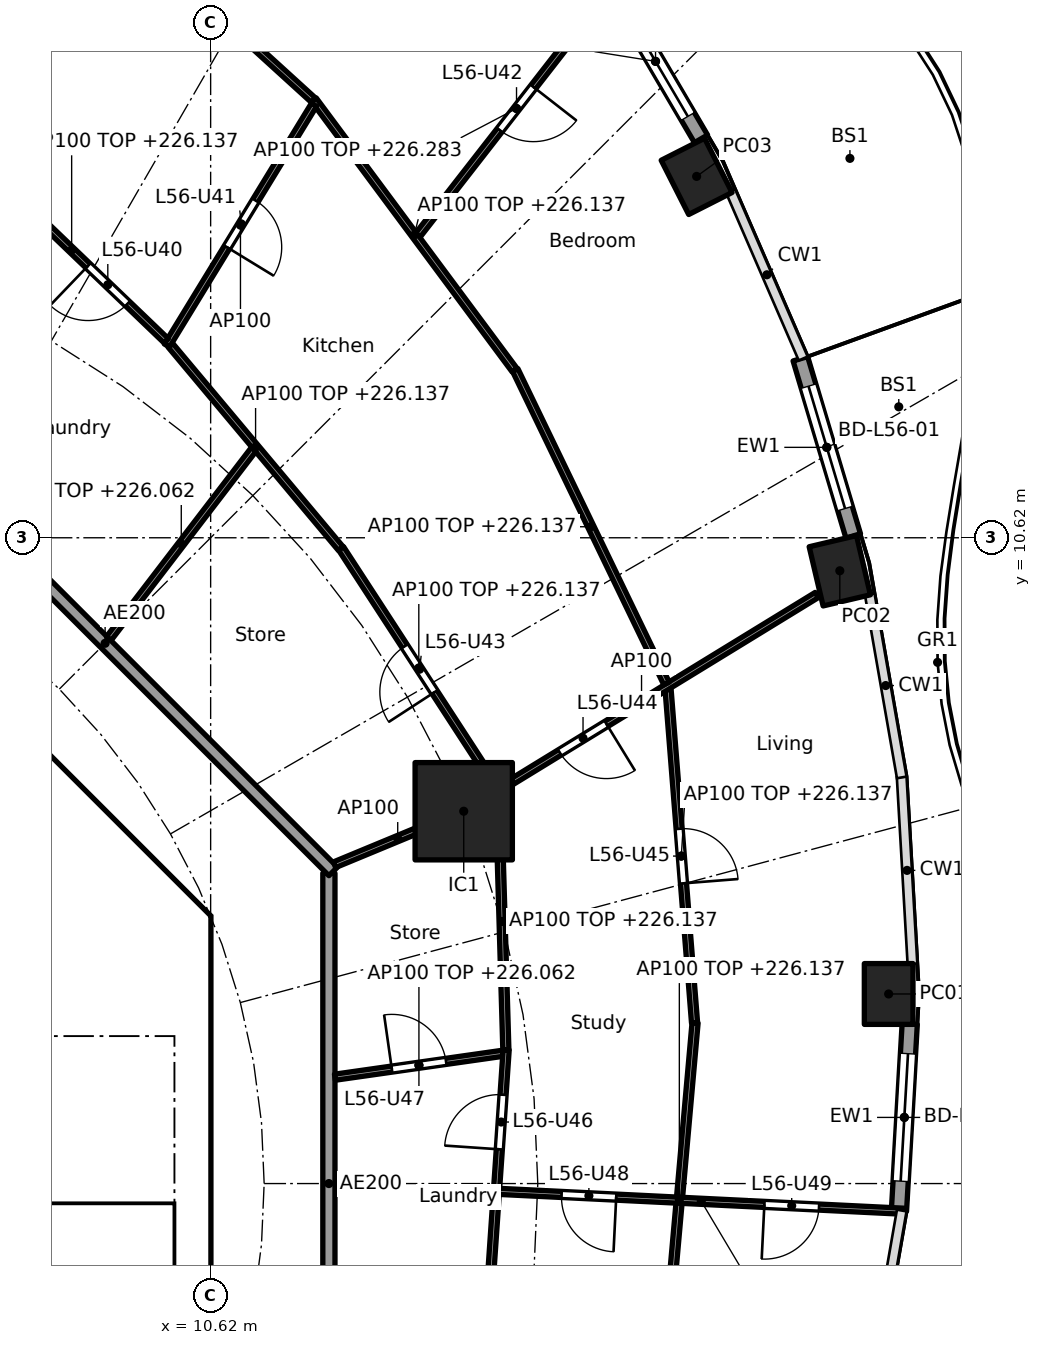
"""IFC4 building model, lengths in metres.
Left out: names, types, materials, properties, quantities, classifications, styles, units other than length and angle.
Written with IfcOpenShell. Run it as: python <this file> out.ifc"""

import sys

from ifc_helpers import new_model, si_unit, direction, frame, frame_2d, origin, origin_2d, place, context, subcontext, project, spatial, polyline, rectangle, hollow_rectangle, outline, extrude, element, fill, save


model = new_model("IFC4")
c1 = context("Model", 3, precision=1e-05, world=origin(), true_north=direction((0.0, 1.0)))
c2 = subcontext(c1, "Body", "Model", "MODEL_VIEW")
j1 = project(units=[si_unit("LENGTHUNIT", "METRE"), si_unit("PLANEANGLEUNIT", "RADIAN")], contexts=[c1])
p1 = place(None, origin())
s1 = spatial("IfcSite", under=j1, at=p1, CompositionType="ELEMENT")
p2 = place(p1, origin())
s2 = spatial("IfcBuilding", under=s1, at=p2, CompositionType="ELEMENT")
p3 = place(p2, frame((0.0, 0.0, 223.3)))
s3 = spatial("IfcBuildingStorey", under=s2, at=p3, CompositionType="ELEMENT", Elevation=223.3)
for number, where, z_axis, x_axis in (
    (1, (21.77, 3.118, 0.0), (0.0, 0.0, 1.0), (0.0, 1.0, 0.0)),
    (2, (20.967, 10.077, 0.0), (0.0, 0.0, 1.0), (-0.229, 0.973, 0.0)),
    (3, (18.612, 16.563, 0.0), (0.0, 0.0, 1.0), (-0.452, 0.892, 0.0)),
):
    element("IfcColumn", number, at=place(p3, frame(where, z_axis=z_axis, x_axis=x_axis)), inside=s3, PredefinedType="COLUMN", context=c2, shape_type="SweptSolid", body=[
        extrude(hollow_rectangle(XDim=1.0, YDim=0.8, WallThickness=0.032, at=origin_2d()), origin(), (0.0, 0.0, 1.0), 3.7),
    ])
p4 = place(p3, frame((14.782, 6.123, 0.0), z_axis=(0.0, 0.0, 1.0), x_axis=(1.0, 0.0, 0.0)))
e4 = element("IfcColumn", 4, at=p4, inside=s3, PredefinedType="COLUMN", context=c2, shape_type="SweptSolid", body=[
    extrude(rectangle(XDim=1.6, YDim=1.6, at=origin_2d()), origin(), (0.0, 0.0, 1.0), 3.7),
])
p5 = place(p3, frame((20.318, 13.564, 0.0), z_axis=(0.0, 0.0, 1.0), x_axis=(0.285785716255, -0.958293548128, 0.0)))
e5 = element("IfcWall", 5, at=p5, inside=s3, PredefinedType="SOLIDWALL", context=c2, shape_type="SweptSolid", body=[
    extrude(rectangle(XDim=3.04, YDim=0.25, at=frame_2d((1.52, 0.0))), origin(), (0.0, 0.0, 1.0), 3.44),
])
p6 = place(p5, frame((0.47, 0.0, 0.0)))
e6 = element("IfcOpeningElement", 6, at=p6, cuts=e5, PredefinedType="OPENING", context=c2, shape_type="SweptSolid", body=[
    extrude(rectangle(XDim=2.1, YDim=2.4, at=frame_2d((1.05, 1.2))), frame((0.0, 0.135, 0.0), z_axis=(0.0, -1.0, 0.0), x_axis=(1.0, 0.0, 0.0)), (0.0, 0.0, 1.0), 0.27),
])
p7 = place(p3, frame((17.188, 19.728, 0.0), z_axis=(0.0, 0.0, 1.0), x_axis=(0.506391620556, -0.862303616269, 0.0)))
e7 = element("IfcWall", 7, at=p7, inside=s3, PredefinedType="SOLIDWALL", context=c2, shape_type="SweptSolid", body=[
    extrude(rectangle(XDim=2.954, YDim=0.25, at=frame_2d((1.477, 0.0))), origin(), (0.0, 0.0, 1.0), 3.44),
])
p8 = place(p7, frame((0.427, 0.0, 0.0)))
e8 = element("IfcOpeningElement", 8, at=p8, cuts=e7, PredefinedType="OPENING", context=c2, shape_type="SweptSolid", body=[
    extrude(rectangle(XDim=2.1, YDim=2.4, at=frame_2d((1.05, 1.2))), frame((0.0, 0.135, 0.0), z_axis=(0.0, -1.0, 0.0), x_axis=(1.0, 0.0, 0.0)), (0.0, 0.0, 1.0), 0.27),
])
p9 = place(p3, frame((22.116, 2.626, 0.0), z_axis=(0.0, 0.0, 1.0), x_axis=(-0.057528189427, -0.998343882348, 0.0)))
e9 = element("IfcWall", 9, at=p9, inside=s3, PredefinedType="SOLIDWALL", context=c2, shape_type="SweptSolid", body=[
    extrude(rectangle(XDim=3.081, YDim=0.25, at=frame_2d((1.541, 0.0))), origin(), (0.0, 0.0, 1.0), 3.44),
])
p10 = place(p9, frame((0.49, 0.0, 0.0)))
e10 = element("IfcOpeningElement", 10, at=p10, cuts=e9, PredefinedType="OPENING", context=c2, shape_type="SweptSolid", body=[
    extrude(rectangle(XDim=2.1, YDim=2.4, at=frame_2d((1.05, 1.2))), frame((0.0, 0.135, 0.0), z_axis=(0.0, -1.0, 0.0), x_axis=(1.0, 0.0, 0.0)), (0.0, 0.0, 1.0), 0.27),
])
p11 = place(p3, frame((9.988, 4.613, 0.0), z_axis=(0.0, 0.0, 1.0), x_axis=(-0.707106781187, 0.707106781187, 0.0)))
e11 = element("IfcWall", 11, at=p11, inside=s3, PredefinedType="SHEAR", context=c2, shape_type="SweptSolid", body=[
    extrude(rectangle(XDim=7.602, YDim=0.6, at=frame_2d((3.801, 0.0))), origin(), (0.0, 0.0, 1.0), 3.44),
])
p12 = place(p11, frame((3.201, 0.0, 0.0)))
e12 = element("IfcOpeningElement", 12, at=p12, cuts=e11, PredefinedType="OPENING", context=c2, shape_type="SweptSolid", body=[
    extrude(rectangle(XDim=1.2, YDim=2.1, at=frame_2d((0.6, 1.05))), frame((0.0, 0.31, 0.0), z_axis=(0.0, -1.0, 0.0), x_axis=(1.0, 0.0, 0.0)), (0.0, 0.0, 1.0), 0.62),
])
p13 = place(p3, frame((6.7, 4.0, 0.0), z_axis=(0.0, 0.0, 1.0), x_axis=(1.0, 0.0, 0.0)))
e13 = element("IfcWall", 13, at=p13, inside=s3, PredefinedType="SOLIDWALL", context=c2, shape_type="SweptSolid", body=[
    extrude(rectangle(XDim=3.325, YDim=0.2, at=frame_2d((1.662, 0.0))), origin(), (0.0, 0.0, 1.0), 3.44),
])
p14 = place(p13, frame((1.25, 0.0, 0.0)))
e14 = element("IfcOpeningElement", 14, at=p14, cuts=e13, PredefinedType="OPENING", context=c2, shape_type="SweptSolid", body=[
    extrude(rectangle(XDim=1.1, YDim=2.1, at=frame_2d((0.55, 1.05))), frame((0.0, 0.11, 0.0), z_axis=(0.0, -1.0, 0.0), x_axis=(1.0, 0.0, 0.0)), (0.0, 0.0, 1.0), 0.22),
])
p15 = place(p3, origin())
e15 = element("IfcWall", 15, at=p15, inside=s3, PredefinedType="SHEAR", context=c2, shape_type="SweptSolid", body=[
    extrude(outline(polyline([(9.776, -4.401), (10.025, -4.152), (10.025, -3.801), (10.025, 4.152), (9.776, 4.401), (10.2, 4.825), (10.625, 4.401), (10.625, -4.401), (10.2, -4.825), (9.776, -4.401)])), origin(), (0.0, 0.0, 1.0), 3.44),
])
p16 = place(p3, frame((12.565, -5.104, 0.0), z_axis=(0.0, 0.0, 1.0), x_axis=(0.0, 1.0, 0.0)))
e16 = element("IfcWall", 16, at=p16, inside=s3, PredefinedType="PARTITIONING", context=c2, shape_type="SweptSolid", body=[
    extrude(rectangle(XDim=10.209, YDim=0.2, at=frame_2d((5.104, 0.0))), origin(), (0.0, 0.0, 1.0), 3.44),
])
p17 = place(p3, frame((12.635, 5.134, 0.0), z_axis=(0.0, 0.0, 1.0), x_axis=(-0.707106781187, 0.707106781187, 0.0)))
e17 = element("IfcWall", 17, at=p17, inside=s3, PredefinedType="PARTITIONING", context=c2, shape_type="SweptSolid", body=[
    extrude(rectangle(XDim=10.609, YDim=0.2, at=frame_2d((5.305, 0.0))), origin(), (0.0, 0.0, 1.0), 3.44),
])
p18 = place(p3, frame((12.664, 1.749, 0.0), z_axis=(0.0, 0.0, 1.0), x_axis=(0.990007147727, 0.14101718849, 0.0)))
e18 = element("IfcWall", 18, at=p18, inside=s3, PredefinedType="PARTITIONING", context=c2, shape_type="SweptSolid", body=[
    extrude(rectangle(XDim=2.791, YDim=0.1, at=frame_2d((1.396, 0.0))), origin(), (0.0, 0.0, 1.0), 2.762),
])
p19 = place(p18, frame((0.946, 0.0, 0.0)))
e19 = element("IfcOpeningElement", 19, at=p19, cuts=e18, PredefinedType="OPENING", context=c2, shape_type="SweptSolid", body=[
    extrude(rectangle(XDim=0.9, YDim=2.1, at=frame_2d((0.45, 1.05))), frame((0.0, 0.06, 0.0), z_axis=(0.0, -1.0, 0.0), x_axis=(1.0, 0.0, 0.0)), (0.0, 0.0, 1.0), 0.12),
])
p20 = place(p3, frame((15.475, 2.2, 0.0), z_axis=(0.0, 0.0, 1.0), x_axis=(-0.029254637498, 0.999571991497, 0.0)))
e20 = element("IfcWall", 20, at=p20, inside=s3, PredefinedType="PARTITIONING", context=c2, shape_type="SweptSolid", body=[
    extrude(rectangle(XDim=4.223, YDim=0.1, at=frame_2d((2.111, 0.0))), origin(), (0.0, 0.0, 1.0), 2.837),
])
p21 = place(p3, frame((15.48, 2.199, 0.0), z_axis=(0.0, 0.0, 1.0), x_axis=(-0.068558685949, -0.997647085186, 0.0)))
e21 = element("IfcWall", 21, at=p21, inside=s3, PredefinedType="PARTITIONING", context=c2, shape_type="SweptSolid", body=[
    extrude(rectangle(XDim=8.365, YDim=0.1, at=frame_2d((4.183, 0.0))), origin(), (0.0, 0.0, 1.0), 2.837),
])
p22 = place(p21, frame((0.74, 0.0, 0.0)))
e22 = element("IfcOpeningElement", 22, at=p22, cuts=e21, PredefinedType="OPENING", context=c2, shape_type="SweptSolid", body=[
    extrude(rectangle(XDim=0.9, YDim=2.1, at=frame_2d((0.45, 1.05))), frame((0.0, 0.06, 0.0), z_axis=(0.0, -1.0, 0.0), x_axis=(1.0, 0.0, 0.0)), (0.0, 0.0, 1.0), 0.12),
])
p23 = place(p3, frame((18.578, 2.642, 0.0), z_axis=(0.0, 0.0, 1.0), x_axis=(-0.079179272956, 0.9968603928, 0.0)))
e23 = element("IfcWall", 23, at=p23, inside=s3, PredefinedType="PARTITIONING", context=c2, shape_type="SweptSolid", body=[
    extrude(rectangle(XDim=5.504, YDim=0.1, at=frame_2d((2.752, 0.0))), origin(), (0.0, 0.0, 1.0), 2.837),
])
p24 = place(p23, frame((2.302, 0.0, 0.0)))
e24 = element("IfcOpeningElement", 24, at=p24, cuts=e23, PredefinedType="OPENING", context=c2, shape_type="SweptSolid", body=[
    extrude(rectangle(XDim=0.9, YDim=2.1, at=frame_2d((0.45, 1.05))), frame((0.0, 0.06, 0.0), z_axis=(0.0, -1.0, 0.0), x_axis=(1.0, 0.0, 0.0)), (0.0, 0.0, 1.0), 0.12),
])
p25 = place(p3, frame((18.586, 2.642, 0.0), z_axis=(0.0, 0.0, 1.0), x_axis=(-0.088638473361, -0.996063863937, 0.0)))
e25 = element("IfcWall", 25, at=p25, inside=s3, PredefinedType="PARTITIONING", context=c2, shape_type="SweptSolid", body=[
    extrude(rectangle(XDim=5.836, YDim=0.1, at=frame_2d((2.918, 0.0))), origin(), (0.0, 0.0, 1.0), 2.837),
])
p26 = place(p3, frame((12.657, 5.243, 0.0), z_axis=(0.0, 0.0, 1.0), x_axis=(0.923864733477, 0.382719158442, 0.0)))
e26 = element("IfcWall", 26, at=p26, inside=s3, PredefinedType="PARTITIONING", context=c2, shape_type="SweptSolid", body=[
    extrude(rectangle(XDim=2.25, YDim=0.1, at=frame_2d((1.125, 0.0))), origin(), (0.0, 0.0, 1.0), 3.44),
])
p27 = place(p3, frame((14.825, 6.149, 0.0), z_axis=(0.0, 0.0, 1.0), x_axis=(0.852781365284, 0.522268075824, 0.0)))
e27 = element("IfcWall", 27, at=p27, inside=s3, PredefinedType="PARTITIONING", context=c2, shape_type="SweptSolid", body=[
    extrude(rectangle(XDim=6.758, YDim=0.1, at=frame_2d((3.379, 0.0))), origin(), (0.0, 0.0, 1.0), 3.44),
])
p28 = place(p27, frame((1.801, 0.0, 0.0)))
e28 = element("IfcOpeningElement", 28, at=p28, cuts=e27, PredefinedType="OPENING", context=c2, shape_type="SweptSolid", body=[
    extrude(rectangle(XDim=0.9, YDim=2.1, at=frame_2d((0.45, 1.05))), frame((0.0, 0.06, 0.0), z_axis=(0.0, -1.0, 0.0), x_axis=(1.0, 0.0, 0.0)), (0.0, 0.0, 1.0), 0.12),
])
p29 = place(p3, frame((15.323, 6.512, 0.0), z_axis=(0.0, 0.0, 1.0), x_axis=(-0.545191322361, 0.8383116497, 0.0)))
e29 = element("IfcWall", 29, at=p29, inside=s3, PredefinedType="PARTITIONING", context=c2, shape_type="SweptSolid", body=[
    extrude(rectangle(XDim=4.693, YDim=0.1, at=frame_2d((2.346, 0.0))), origin(), (0.0, 0.0, 1.0), 2.837),
])
p30 = place(p29, frame((1.871, 0.0, 0.0)))
e30 = element("IfcOpeningElement", 30, at=p30, cuts=e29, PredefinedType="OPENING", context=c2, shape_type="SweptSolid", body=[
    extrude(rectangle(XDim=0.9, YDim=2.1, at=frame_2d((0.45, 1.05))), frame((0.0, 0.06, 0.0), z_axis=(0.0, -1.0, 0.0), x_axis=(1.0, 0.0, 0.0)), (0.0, 0.0, 1.0), 0.12),
])
p31 = place(p3, frame((18.117, 8.224, 0.0), z_axis=(0.0, 0.0, 1.0), x_axis=(-0.434647681571, 0.900600573453, 0.0)))
e31 = element("IfcWall", 31, at=p31, inside=s3, PredefinedType="PARTITIONING", context=c2, shape_type="SweptSolid", body=[
    extrude(rectangle(XDim=5.724, YDim=0.1, at=frame_2d((2.862, 0.0))), origin(), (0.0, 0.0, 1.0), 2.837),
])
p32 = place(p3, frame((12.759, 10.443, 0.0), z_axis=(0.0, 0.0, 1.0), x_axis=(-0.642225196965, 0.766516011825, 0.0)))
e32 = element("IfcWall", 32, at=p32, inside=s3, PredefinedType="PARTITIONING", context=c2, shape_type="SweptSolid", body=[
    extrude(rectangle(XDim=4.361, YDim=0.1, at=frame_2d((2.18, 0.0))), origin(), (0.0, 0.0, 1.0), 2.837),
])
p33 = place(p3, frame((15.621, 13.374, 0.0), z_axis=(0.0, 0.0, 1.0), x_axis=(-0.596165830899, 0.802861321816, 0.0)))
e33 = element("IfcWall", 33, at=p33, inside=s3, PredefinedType="PARTITIONING", context=c2, shape_type="SweptSolid", body=[
    extrude(rectangle(XDim=5.542, YDim=0.1, at=frame_2d((2.771, 0.0))), origin(), (0.0, 0.0, 1.0), 2.837),
])
p34 = place(p3, frame((8.946, 8.964, 0.0), z_axis=(0.0, 0.0, 1.0), x_axis=(0.608213063121, 0.793773815296, 0.0)))
e34 = element("IfcWall", 34, at=p34, inside=s3, PredefinedType="PARTITIONING", context=c2, shape_type="SweptSolid", body=[
    extrude(rectangle(XDim=3.918, YDim=0.1, at=frame_2d((1.959, 0.0))), origin(), (0.0, 0.0, 1.0), 2.762),
])
p35 = place(p3, frame((14.029, 15.598, 0.0), z_axis=(0.0, 0.0, 1.0), x_axis=(0.614558710688, 0.788871086501, 0.0)))
e35 = element("IfcWall", 35, at=p35, inside=s3, PredefinedType="PARTITIONING", context=c2, shape_type="SweptSolid", body=[
    extrude(rectangle(XDim=5.276, YDim=0.1, at=frame_2d((2.638, 0.0))), origin(), (0.0, 0.0, 1.0), 2.983),
])
p36 = place(p35, frame((2.188, 0.0, 0.0)))
e36 = element("IfcOpeningElement", 36, at=p36, cuts=e35, PredefinedType="OPENING", context=c2, shape_type="SweptSolid", body=[
    extrude(rectangle(XDim=0.9, YDim=2.1, at=frame_2d((0.45, 1.05))), frame((0.0, 0.06, 0.0), z_axis=(0.0, -1.0, 0.0), x_axis=(1.0, 0.0, 0.0)), (0.0, 0.0, 1.0), 0.12),
])
p37 = place(p3, frame((9.9, 13.781, 0.0), z_axis=(0.0, 0.0, 1.0), x_axis=(0.521464905534, 0.853272730313, 0.0)))
e37 = element("IfcWall", 37, at=p37, inside=s3, PredefinedType="PARTITIONING", context=c2, shape_type="SweptSolid", body=[
    extrude(rectangle(XDim=4.641, YDim=0.1, at=frame_2d((2.32, 0.0))), origin(), (0.0, 0.0, 1.0), 3.44),
])
p38 = place(p37, frame((1.895, 0.0, 0.0)))
e38 = element("IfcOpeningElement", 38, at=p38, cuts=e37, PredefinedType="OPENING", context=c2, shape_type="SweptSolid", body=[
    extrude(rectangle(XDim=0.9, YDim=2.1, at=frame_2d((0.45, 1.05))), frame((0.0, 0.06, 0.0), z_axis=(0.0, -1.0, 0.0), x_axis=(1.0, 0.0, 0.0)), (0.0, 0.0, 1.0), 0.12),
])
p39 = place(p3, frame((9.89, 13.858, 0.0), z_axis=(0.0, 0.0, 1.0), x_axis=(-0.72167233993, 0.692234811159, 0.0)))
e39 = element("IfcWall", 39, at=p39, inside=s3, PredefinedType="PARTITIONING", context=c2, shape_type="SweptSolid", body=[
    extrude(rectangle(XDim=4.313, YDim=0.1, at=frame_2d((2.156, 0.0))), origin(), (0.0, 0.0, 1.0), 2.837),
])
p40 = place(p39, frame((0.883, 0.0, 0.0)))
e40 = element("IfcOpeningElement", 40, at=p40, cuts=e39, PredefinedType="OPENING", context=c2, shape_type="SweptSolid", body=[
    extrude(rectangle(XDim=0.9, YDim=2.1, at=frame_2d((0.45, 1.05))), frame((0.0, 0.06, 0.0), z_axis=(0.0, -1.0, 0.0), x_axis=(1.0, 0.0, 0.0)), (0.0, 0.0, 1.0), 0.12),
])
p41 = place(p3, frame((12.31, 17.817, 0.0), z_axis=(0.0, 0.0, 1.0), x_axis=(-0.739697052892, 0.672940019573, 0.0)))
e41 = element("IfcWall", 41, at=p41, inside=s3, PredefinedType="PARTITIONING", context=c2, shape_type="SweptSolid", body=[
    extrude(rectangle(XDim=5.365, YDim=0.1, at=frame_2d((2.683, 0.0))), origin(), (0.0, 0.0, 1.0), 2.837),
])
p42 = place(p41, frame((2.208, 0.0, 0.0)))
e42 = element("IfcOpeningElement", 42, at=p42, cuts=e41, PredefinedType="OPENING", context=c2, shape_type="SweptSolid", body=[
    extrude(rectangle(XDim=0.9, YDim=2.1, at=frame_2d((0.45, 1.05))), frame((0.0, 0.06, 0.0), z_axis=(0.0, -1.0, 0.0), x_axis=(1.0, 0.0, 0.0)), (0.0, 0.0, 1.0), 0.12),
])
p43 = place(p3, frame((15.353, -0.128, 0.0), z_axis=(0.0, 0.0, 1.0), x_axis=(0.99879606888, -0.049055201451, 0.0)))
e43 = element("IfcWall", 43, at=p43, inside=s3, PredefinedType="PARTITIONING", context=c2, shape_type="SweptSolid", body=[
    extrude(rectangle(XDim=6.679, YDim=0.1, at=frame_2d((3.339, 0.0))), origin(), (0.0, 0.0, 1.0), 2.983),
])
p44 = place(p43, frame((1.039, 0.0, 0.0)))
e44 = element("IfcOpeningElement", 44, at=p44, cuts=e43, PredefinedType="OPENING", context=c2, shape_type="SweptSolid", body=[
    extrude(rectangle(XDim=0.9, YDim=2.1, at=frame_2d((0.45, 1.05))), frame((0.0, 0.06, 0.0), z_axis=(0.0, -1.0, 0.0), x_axis=(1.0, 0.0, 0.0)), (0.0, 0.0, 1.0), 0.12),
])
p45 = place(p43, frame((4.378, 0.0, 0.0)))
e45 = element("IfcOpeningElement", 45, at=p45, cuts=e43, PredefinedType="OPENING", context=c2, shape_type="SweptSolid", body=[
    extrude(rectangle(XDim=0.9, YDim=2.1, at=frame_2d((0.45, 1.05))), frame((0.0, 0.06, 0.0), z_axis=(0.0, -1.0, 0.0), x_axis=(1.0, 0.0, 0.0)), (0.0, 0.0, 1.0), 0.12),
])
p46 = place(p6, origin())
e46 = element("IfcDoor", 46, at=p46, inside=s3, OperationType="SLIDING_TO_LEFT", PredefinedType="DOOR", context=c2, shape_type="SweptSolid", body=[
    extrude(rectangle(XDim=2.1, YDim=2.4, at=frame_2d((1.05, 1.2))), frame((0.0, 0.025, 0.0), z_axis=(0.0, -1.0, 0.0), x_axis=(1.0, 0.0, 0.0)), (0.0, 0.0, 1.0), 0.05),
])
fill(e6, e46)
p47 = place(p8, origin())
e47 = element("IfcDoor", 47, at=p47, inside=s3, OperationType="SLIDING_TO_LEFT", PredefinedType="DOOR", context=c2, shape_type="SweptSolid", body=[
    extrude(rectangle(XDim=2.1, YDim=2.4, at=frame_2d((1.05, 1.2))), frame((0.0, 0.025, 0.0), z_axis=(0.0, -1.0, 0.0), x_axis=(1.0, 0.0, 0.0)), (0.0, 0.0, 1.0), 0.05),
])
fill(e8, e47)
p48 = place(p10, origin())
e48 = element("IfcDoor", 48, at=p48, inside=s3, OperationType="SLIDING_TO_LEFT", PredefinedType="DOOR", context=c2, shape_type="SweptSolid", body=[
    extrude(rectangle(XDim=2.1, YDim=2.4, at=frame_2d((1.05, 1.2))), frame((0.0, 0.025, 0.0), z_axis=(0.0, -1.0, 0.0), x_axis=(1.0, 0.0, 0.0)), (0.0, 0.0, 1.0), 0.05),
])
fill(e10, e48)
p49 = place(p14, frame((1.1, 0.0, 0.0), x_axis=(-1.0, 0.0, 0.0)))
e49 = element("IfcDoor", 49, at=p49, inside=s3, OperationType="SINGLE_SWING_RIGHT", PredefinedType="DOOR", context=c2, shape_type="SweptSolid", body=[
    extrude(rectangle(XDim=1.1, YDim=2.1, at=frame_2d((0.55, 1.05))), frame((0.0, 0.025, 0.0), z_axis=(0.0, -1.0, 0.0), x_axis=(1.0, 0.0, 0.0)), (0.0, 0.0, 1.0), 0.05),
])
fill(e14, e49)
p50 = place(p40, origin())
e50 = element("IfcDoor", 50, at=p50, inside=s3, OperationType="SINGLE_SWING_RIGHT", PredefinedType="DOOR", context=c2, shape_type="SweptSolid", body=[
    extrude(rectangle(XDim=0.9, YDim=2.1, at=frame_2d((0.45, 1.05))), frame((0.0, 0.025, 0.0), z_axis=(0.0, -1.0, 0.0), x_axis=(1.0, 0.0, 0.0)), (0.0, 0.0, 1.0), 0.05),
])
fill(e40, e50)
p51 = place(p38, frame((0.9, 0.0, 0.0), x_axis=(-1.0, 0.0, 0.0)))
e51 = element("IfcDoor", 51, at=p51, inside=s3, OperationType="SINGLE_SWING_RIGHT", PredefinedType="DOOR", context=c2, shape_type="SweptSolid", body=[
    extrude(rectangle(XDim=0.9, YDim=2.1, at=frame_2d((0.45, 1.05))), frame((0.0, 0.025, 0.0), z_axis=(0.0, -1.0, 0.0), x_axis=(1.0, 0.0, 0.0)), (0.0, 0.0, 1.0), 0.05),
])
fill(e38, e51)
p52 = place(p36, frame((0.9, 0.0, 0.0), x_axis=(-1.0, 0.0, 0.0)))
e52 = element("IfcDoor", 52, at=p52, inside=s3, OperationType="SINGLE_SWING_LEFT", PredefinedType="DOOR", context=c2, shape_type="SweptSolid", body=[
    extrude(rectangle(XDim=0.9, YDim=2.1, at=frame_2d((0.45, 1.05))), frame((0.0, 0.025, 0.0), z_axis=(0.0, -1.0, 0.0), x_axis=(1.0, 0.0, 0.0)), (0.0, 0.0, 1.0), 0.05),
])
fill(e36, e52)
p53 = place(p30, origin())
e53 = element("IfcDoor", 53, at=p53, inside=s3, OperationType="SINGLE_SWING_LEFT", PredefinedType="DOOR", context=c2, shape_type="SweptSolid", body=[
    extrude(rectangle(XDim=0.9, YDim=2.1, at=frame_2d((0.45, 1.05))), frame((0.0, 0.025, 0.0), z_axis=(0.0, -1.0, 0.0), x_axis=(1.0, 0.0, 0.0)), (0.0, 0.0, 1.0), 0.05),
])
fill(e30, e53)
p54 = place(p28, frame((0.9, 0.0, 0.0), x_axis=(-1.0, 0.0, 0.0)))
e54 = element("IfcDoor", 54, at=p54, inside=s3, OperationType="SINGLE_SWING_LEFT", PredefinedType="DOOR", context=c2, shape_type="SweptSolid", body=[
    extrude(rectangle(XDim=0.9, YDim=2.1, at=frame_2d((0.45, 1.05))), frame((0.0, 0.025, 0.0), z_axis=(0.0, -1.0, 0.0), x_axis=(1.0, 0.0, 0.0)), (0.0, 0.0, 1.0), 0.05),
])
fill(e28, e54)
p55 = place(p24, frame((0.9, 0.0, 0.0), x_axis=(-1.0, 0.0, 0.0)))
e55 = element("IfcDoor", 55, at=p55, inside=s3, OperationType="SINGLE_SWING_RIGHT", PredefinedType="DOOR", context=c2, shape_type="SweptSolid", body=[
    extrude(rectangle(XDim=0.9, YDim=2.1, at=frame_2d((0.45, 1.05))), frame((0.0, 0.025, 0.0), z_axis=(0.0, -1.0, 0.0), x_axis=(1.0, 0.0, 0.0)), (0.0, 0.0, 1.0), 0.05),
])
fill(e24, e55)
p56 = place(p22, frame((0.9, 0.0, 0.0), x_axis=(-1.0, 0.0, 0.0)))
e56 = element("IfcDoor", 56, at=p56, inside=s3, OperationType="SINGLE_SWING_LEFT", PredefinedType="DOOR", context=c2, shape_type="SweptSolid", body=[
    extrude(rectangle(XDim=0.9, YDim=2.1, at=frame_2d((0.45, 1.05))), frame((0.0, 0.025, 0.0), z_axis=(0.0, -1.0, 0.0), x_axis=(1.0, 0.0, 0.0)), (0.0, 0.0, 1.0), 0.05),
])
fill(e22, e56)
p57 = place(p19, origin())
e57 = element("IfcDoor", 57, at=p57, inside=s3, OperationType="SINGLE_SWING_LEFT", PredefinedType="DOOR", context=c2, shape_type="SweptSolid", body=[
    extrude(rectangle(XDim=0.9, YDim=2.1, at=frame_2d((0.45, 1.05))), frame((0.0, 0.025, 0.0), z_axis=(0.0, -1.0, 0.0), x_axis=(1.0, 0.0, 0.0)), (0.0, 0.0, 1.0), 0.05),
])
fill(e19, e57)
p58 = place(p44, frame((0.9, 0.0, 0.0), x_axis=(-1.0, 0.0, 0.0)))
e58 = element("IfcDoor", 58, at=p58, inside=s3, OperationType="SINGLE_SWING_LEFT", PredefinedType="DOOR", context=c2, shape_type="SweptSolid", body=[
    extrude(rectangle(XDim=0.9, YDim=2.1, at=frame_2d((0.45, 1.05))), frame((0.0, 0.025, 0.0), z_axis=(0.0, -1.0, 0.0), x_axis=(1.0, 0.0, 0.0)), (0.0, 0.0, 1.0), 0.05),
])
fill(e44, e58)
p59 = place(p45, frame((0.9, 0.0, 0.0), x_axis=(-1.0, 0.0, 0.0)))
e59 = element("IfcDoor", 59, at=p59, inside=s3, OperationType="SINGLE_SWING_RIGHT", PredefinedType="DOOR", context=c2, shape_type="SweptSolid", body=[
    extrude(rectangle(XDim=0.9, YDim=2.1, at=frame_2d((0.45, 1.05))), frame((0.0, 0.025, 0.0), z_axis=(0.0, -1.0, 0.0), x_axis=(1.0, 0.0, 0.0)), (0.0, 0.0, 1.0), 0.05),
])
fill(e45, e59)
save(model, sys.argv[1])
